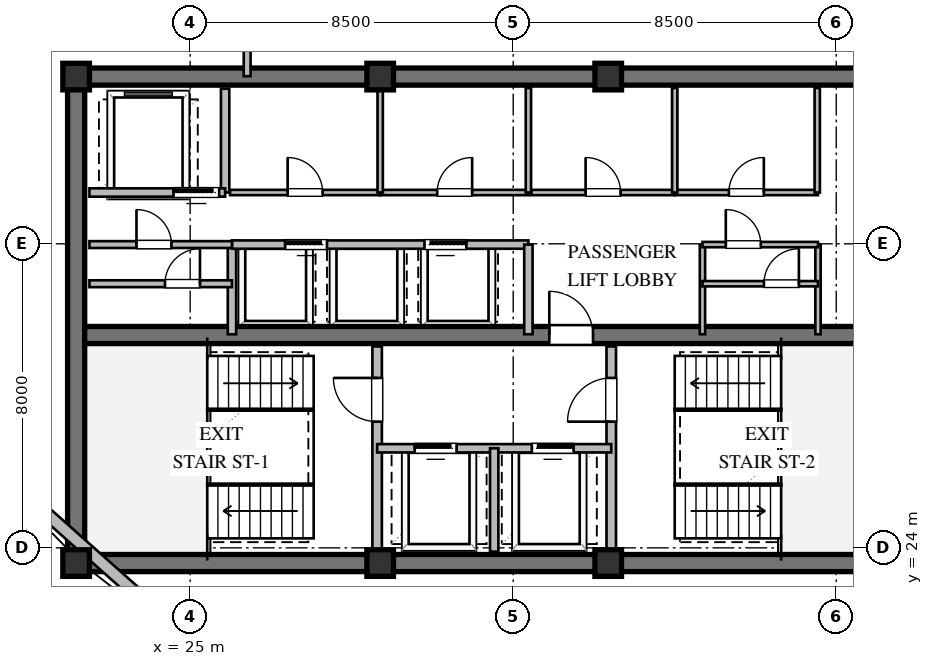
"""IFC4 building model, lengths in metres.
Left out: names, types, materials, properties, quantities, classifications, styles, units other than length and angle.
Written with IfcOpenShell. Run it as: python <this file> out.ifc"""

import sys

from ifc_helpers import new_model, si_unit, direction, frame, frame_2d, origin, origin_2d, place, context, subcontext, project, spatial, rectangle, extrude, element, fill, save


model = new_model("IFC4")
c1 = context("Model", 3, precision=1e-05, world=origin(), true_north=direction((0.0, 1.0)))
c2 = subcontext(c1, "Body", "Model", "MODEL_VIEW")
j1 = project(units=[si_unit("LENGTHUNIT", "METRE"), si_unit("PLANEANGLEUNIT", "RADIAN")], contexts=[c1])
p1 = place(None, origin())
s1 = spatial("IfcSite", under=j1, at=p1, CompositionType="ELEMENT")
p2 = place(p1, origin())
s2 = spatial("IfcBuilding", under=s1, at=p2, CompositionType="ELEMENT")
p3 = place(p2, frame((0.0, 0.0, 289.0)))
s3 = spatial("IfcBuildingStorey", under=s2, at=p3, CompositionType="ELEMENT", Elevation=289.0)
for number, where, z_axis, x_axis in (
    (1, (21.775, 23.6, 0.0), (0.0, 0.0, 1.0), (1.0, 0.0, 0.0)),
    (2, (21.775, 36.4, 0.0), (0.0, 0.0, 1.0), (1.0, 0.0, 0.0)),
):
    element("IfcWall", number, at=place(p3, frame(where, z_axis=z_axis, x_axis=x_axis)), inside=s3, PredefinedType="SHEAR", context=c2, shape_type="SweptSolid", body=[
        extrude(rectangle(XDim=22.45, YDim=0.45, at=frame_2d((11.225, 0.0))), origin(), (0.0, 0.0, 1.0), 3.48),
    ])
p4 = place(p3, frame((22.0, 23.825, 0.0), z_axis=(0.0, 0.0, 1.0), x_axis=(0.0, 1.0, 0.0)))
e3 = element("IfcWall", 3, at=p4, inside=s3, PredefinedType="SHEAR", context=c2, shape_type="SweptSolid", body=[
    extrude(rectangle(XDim=12.35, YDim=0.45, at=frame_2d((6.175, 0.0))), origin(), (0.0, 0.0, 1.0), 3.48),
])
p5 = place(p3, frame((22.225, 29.6, 0.0), z_axis=(0.0, 0.0, 1.0), x_axis=(1.0, 0.0, 0.0)))
e4 = element("IfcWall", 4, at=p5, inside=s3, PredefinedType="SHEAR", context=c2, shape_type="SweptSolid", body=[
    extrude(rectangle(XDim=21.55, YDim=0.45, at=frame_2d((10.775, 0.0))), origin(), (0.0, 0.0, 1.0), 3.48),
])
p6 = place(p5, frame((12.225, 0.0, 0.0)))
e5 = element("IfcOpeningElement", 5, at=p6, cuts=e4, PredefinedType="OPENING", context=c2, shape_type="SweptSolid", body=[
    extrude(rectangle(XDim=1.15, YDim=2.1, at=frame_2d((0.575, 1.05))), frame((0.0, 0.235, 0.0), z_axis=(0.0, -1.0, 0.0), x_axis=(1.0, 0.0, 0.0)), (0.0, 0.0, 1.0), 0.47),
])
for number, where, z_axis, x_axis in (
    (6, (22.0, 23.6, 0.0), (0.0, 0.0, 1.0), (1.0, 0.0, 0.0)),
    (7, (30.0, 23.6, 0.0), (0.0, 0.0, 1.0), (1.0, 0.0, 0.0)),
    (8, (36.0, 23.6, 0.0), (0.0, 0.0, 1.0), (1.0, 0.0, 0.0)),
    (9, (36.0, 36.4, 0.0), (0.0, 0.0, 1.0), (1.0, 0.0, 0.0)),
    (10, (30.0, 36.4, 0.0), (0.0, 0.0, 1.0), (1.0, 0.0, 0.0)),
    (11, (22.0, 36.4, 0.0), (0.0, 0.0, 1.0), (1.0, 0.0, 0.0)),
):
    element("IfcColumn", number, at=place(p3, frame(where, z_axis=z_axis, x_axis=x_axis)), inside=s3, PredefinedType="COLUMN", context=c2, shape_type="SweptSolid", body=[
        extrude(rectangle(XDim=0.7, YDim=0.7, at=origin_2d()), origin(), (0.0, 0.0, 1.0), 3.8),
    ])
p7 = place(p3, frame((24.648, 21.849, 0.0), z_axis=(0.0, 0.0, 1.0), x_axis=(-0.747068410291, 0.664747162721, 0.0)))
e12 = element("IfcWall", 12, at=p7, inside=s3, PredefinedType="STANDARD", context=c2, shape_type="SweptSolid", body=[
    extrude(rectangle(XDim=5.928, YDim=0.32, at=frame_2d((2.964, 0.0))), origin(), (0.0, 0.0, 1.0), 2.35),
])
p8 = place(p3, frame((29.92, 23.9, 0.0), z_axis=(0.0, 0.0, 1.0), x_axis=(0.0, 1.0, 0.0)))
e13 = element("IfcWall", 13, at=p8, inside=s3, PredefinedType="SOLIDWALL", context=c2, shape_type="SweptSolid", body=[
    extrude(rectangle(XDim=5.4, YDim=0.25, at=frame_2d((2.7, 0.0))), origin(), (0.0, 0.0, 1.0), 2.47),
])
p9 = place(p8, frame((3.421, 0.0, 0.0)))
e14 = element("IfcOpeningElement", 14, at=p9, cuts=e13, PredefinedType="OPENING", context=c2, shape_type="SweptSolid", body=[
    extrude(rectangle(XDim=1.15, YDim=2.1, at=frame_2d((0.575, 1.05))), frame((0.0, 0.135, 0.0), z_axis=(0.0, -1.0, 0.0), x_axis=(1.0, 0.0, 0.0)), (0.0, 0.0, 1.0), 0.27),
])
p10 = place(p3, frame((36.08, 23.9, 0.0), z_axis=(0.0, 0.0, 1.0), x_axis=(0.0, 1.0, 0.0)))
e15 = element("IfcWall", 15, at=p10, inside=s3, PredefinedType="SOLIDWALL", context=c2, shape_type="SweptSolid", body=[
    extrude(rectangle(XDim=5.4, YDim=0.25, at=frame_2d((2.7, 0.0))), origin(), (0.0, 0.0, 1.0), 3.48),
])
p11 = place(p10, frame((3.421, 0.0, 0.0)))
e16 = element("IfcOpeningElement", 16, at=p11, cuts=e15, PredefinedType="OPENING", context=c2, shape_type="SweptSolid", body=[
    extrude(rectangle(XDim=1.15, YDim=2.1, at=frame_2d((0.575, 1.05))), frame((0.0, 0.135, 0.0), z_axis=(0.0, -1.0, 0.0), x_axis=(1.0, 0.0, 0.0)), (0.0, 0.0, 1.0), 0.27),
])
p12 = place(p3, frame((29.92, 26.62, 0.0), z_axis=(0.0, 0.0, 1.0), x_axis=(1.0, 0.0, 0.0)))
e17 = element("IfcWall", 17, at=p12, inside=s3, PredefinedType="SOLIDWALL", context=c2, shape_type="SweptSolid", body=[
    extrude(rectangle(XDim=6.16, YDim=0.22, at=frame_2d((3.08, 0.0))), origin(), (0.0, 0.0, 1.0), 3.48),
])
p13 = place(p12, frame((0.99, 0.0, 0.0)))
e18 = element("IfcOpeningElement", 18, at=p13, cuts=e17, PredefinedType="OPENING", context=c2, shape_type="SweptSolid", body=[
    extrude(rectangle(XDim=1.1, YDim=2.1, at=frame_2d((0.55, 1.05))), frame((0.0, 0.12, 0.0), z_axis=(0.0, -1.0, 0.0), x_axis=(1.0, 0.0, 0.0)), (0.0, 0.0, 1.0), 0.24),
])
p14 = place(p12, frame((4.07, 0.0, 0.0)))
e19 = element("IfcOpeningElement", 19, at=p14, cuts=e17, PredefinedType="OPENING", context=c2, shape_type="SweptSolid", body=[
    extrude(rectangle(XDim=1.1, YDim=2.1, at=frame_2d((0.55, 1.05))), frame((0.0, 0.12, 0.0), z_axis=(0.0, -1.0, 0.0), x_axis=(1.0, 0.0, 0.0)), (0.0, 0.0, 1.0), 0.24),
])
p15 = place(p3, frame((33.0, 23.9, 0.0), z_axis=(0.0, 0.0, 1.0), x_axis=(0.0, 1.0, 0.0)))
e20 = element("IfcWall", 20, at=p15, inside=s3, PredefinedType="SOLIDWALL", context=c2, shape_type="SweptSolid", body=[
    extrude(rectangle(XDim=2.72, YDim=0.22, at=frame_2d((1.36, 0.0))), origin(), (0.0, 0.0, 1.0), 3.48),
])
p16 = place(p3, frame((25.92, 33.35, 0.0), z_axis=(0.0, 0.0, 1.0), x_axis=(0.0, 1.0, 0.0)))
e21 = element("IfcWall", 21, at=p16, inside=s3, PredefinedType="SOLIDWALL", context=c2, shape_type="SweptSolid", body=[
    extrude(rectangle(XDim=2.73, YDim=0.22, at=frame_2d((1.365, 0.0))), origin(), (0.0, 0.0, 1.0), 3.48),
])
p17 = place(p3, frame((22.35, 33.35, 0.0), z_axis=(0.0, 0.0, 1.0), x_axis=(1.0, 0.0, 0.0)))
e22 = element("IfcWall", 22, at=p17, inside=s3, PredefinedType="SOLIDWALL", context=c2, shape_type="SweptSolid", body=[
    extrude(rectangle(XDim=3.57, YDim=0.22, at=frame_2d((1.785, 0.0))), origin(), (0.0, 0.0, 1.0), 3.48),
])
p18 = place(p17, frame((2.213, 0.0, 0.0)))
e23 = element("IfcOpeningElement", 23, at=p18, cuts=e22, PredefinedType="OPENING", context=c2, shape_type="SweptSolid", body=[
    extrude(rectangle(XDim=1.2, YDim=2.1, at=frame_2d((0.6, 1.05))), frame((0.0, 0.12, 0.0), z_axis=(0.0, -1.0, 0.0), x_axis=(1.0, 0.0, 0.0)), (0.0, 0.0, 1.0), 0.24),
])
p19 = place(p3, frame((26.1, 29.62, 0.0), z_axis=(0.0, 0.0, 1.0), x_axis=(0.0, 1.0, 0.0)))
e24 = element("IfcWall", 24, at=p19, inside=s3, PredefinedType="SOLIDWALL", context=c2, shape_type="SweptSolid", body=[
    extrude(rectangle(XDim=2.36, YDim=0.22, at=frame_2d((1.18, 0.0))), origin(), (0.0, 0.0, 1.0), 3.48),
])
p20 = place(p3, frame((26.1, 31.98, 0.0), z_axis=(0.0, 0.0, 1.0), x_axis=(1.0, 0.0, 0.0)))
e25 = element("IfcWall", 25, at=p20, inside=s3, PredefinedType="SOLIDWALL", context=c2, shape_type="SweptSolid", body=[
    extrude(rectangle(XDim=7.8, YDim=0.22, at=frame_2d((3.9, 0.0))), origin(), (0.0, 0.0, 1.0), 3.48),
])
p21 = place(p20, frame((1.4, 0.0, 0.0)))
e26 = element("IfcOpeningElement", 26, at=p21, cuts=e25, PredefinedType="OPENING", context=c2, shape_type="SweptSolid", body=[
    extrude(rectangle(XDim=1.1, YDim=2.1, at=frame_2d((0.55, 1.05))), frame((0.0, 0.12, 0.0), z_axis=(0.0, -1.0, 0.0), x_axis=(1.0, 0.0, 0.0)), (0.0, 0.0, 1.0), 0.24),
])
p22 = place(p20, frame((5.066, 0.0, 0.0)))
e27 = element("IfcOpeningElement", 27, at=p22, cuts=e25, PredefinedType="OPENING", context=c2, shape_type="SweptSolid", body=[
    extrude(rectangle(XDim=1.1, YDim=2.1, at=frame_2d((0.55, 1.05))), frame((0.0, 0.12, 0.0), z_axis=(0.0, -1.0, 0.0), x_axis=(1.0, 0.0, 0.0)), (0.0, 0.0, 1.0), 0.24),
])
p23 = place(p3, frame((33.9, 29.62, 0.0), z_axis=(0.0, 0.0, 1.0), x_axis=(0.0, 1.0, 0.0)))
e28 = element("IfcWall", 28, at=p23, inside=s3, PredefinedType="SOLIDWALL", context=c2, shape_type="SweptSolid", body=[
    extrude(rectangle(XDim=2.36, YDim=0.22, at=frame_2d((1.18, 0.0))), origin(), (0.0, 0.0, 1.0), 3.48),
])
p24 = place(p3, frame((26.05, 33.35, 0.0), z_axis=(0.0, 0.0, 1.0), x_axis=(1.0, 0.0, 0.0)))
e29 = element("IfcWall", 29, at=p24, inside=s3, PredefinedType="PARTITIONING", context=c2, shape_type="SweptSolid", body=[
    extrude(rectangle(XDim=3.95, YDim=0.14, at=frame_2d((1.975, 0.0))), origin(), (0.0, 0.0, 1.0), 3.48),
])
p25 = place(p24, frame((1.515, 0.0, 0.0)))
e30 = element("IfcOpeningElement", 30, at=p25, cuts=e29, PredefinedType="OPENING", context=c2, shape_type="SweptSolid", body=[
    extrude(rectangle(XDim=0.92, YDim=2.1, at=frame_2d((0.46, 1.05))), frame((0.0, 0.08, 0.0), z_axis=(0.0, -1.0, 0.0), x_axis=(1.0, 0.0, 0.0)), (0.0, 0.0, 1.0), 0.16),
])
p26 = place(p3, frame((30.0, 33.35, 0.0), z_axis=(0.0, 0.0, 1.0), x_axis=(1.0, 0.0, 0.0)))
e31 = element("IfcWall", 31, at=p26, inside=s3, PredefinedType="PARTITIONING", context=c2, shape_type="SweptSolid", body=[
    extrude(rectangle(XDim=3.92, YDim=0.14, at=frame_2d((1.96, 0.0))), origin(), (0.0, 0.0, 1.0), 3.48),
])
p27 = place(p26, frame((1.5, 0.0, 0.0)))
e32 = element("IfcOpeningElement", 32, at=p27, cuts=e31, PredefinedType="OPENING", context=c2, shape_type="SweptSolid", body=[
    extrude(rectangle(XDim=0.92, YDim=2.1, at=frame_2d((0.46, 1.05))), frame((0.0, 0.08, 0.0), z_axis=(0.0, -1.0, 0.0), x_axis=(1.0, 0.0, 0.0)), (0.0, 0.0, 1.0), 0.16),
])
for number, where, z_axis, x_axis in (
    (33, (30.0, 33.35, 0.0), (0.0, 0.0, 1.0), (0.0, 1.0, 0.0)),
    (34, (33.9, 33.35, 0.0), (0.0, 0.0, 1.0), (0.0, 1.0, 0.0)),
):
    element("IfcWall", number, at=place(p3, frame(where, z_axis=z_axis, x_axis=x_axis)), inside=s3, PredefinedType="PARTITIONING", context=c2, shape_type="SweptSolid", body=[
        extrude(rectangle(XDim=2.75, YDim=0.14, at=frame_2d((1.375, 0.0))), origin(), (0.0, 0.0, 1.0), 3.48),
    ])
p28 = place(p3, frame((33.98, 33.35, 0.0), z_axis=(0.0, 0.0, 1.0), x_axis=(1.0, 0.0, 0.0)))
e35 = element("IfcWall", 35, at=p28, inside=s3, PredefinedType="PARTITIONING", context=c2, shape_type="SweptSolid", body=[
    extrude(rectangle(XDim=3.77, YDim=0.14, at=frame_2d((1.885, 0.0))), origin(), (0.0, 0.0, 1.0), 3.48),
])
p29 = place(p28, frame((1.425, 0.0, 0.0)))
e36 = element("IfcOpeningElement", 36, at=p29, cuts=e35, PredefinedType="OPENING", context=c2, shape_type="SweptSolid", body=[
    extrude(rectangle(XDim=0.92, YDim=2.1, at=frame_2d((0.46, 1.05))), frame((0.0, 0.08, 0.0), z_axis=(0.0, -1.0, 0.0), x_axis=(1.0, 0.0, 0.0)), (0.0, 0.0, 1.0), 0.16),
])
p30 = place(p3, frame((37.75, 33.35, 0.0), z_axis=(0.0, 0.0, 1.0), x_axis=(1.0, 0.0, 0.0)))
e37 = element("IfcWall", 37, at=p30, inside=s3, PredefinedType="PARTITIONING", context=c2, shape_type="SweptSolid", body=[
    extrude(rectangle(XDim=3.77, YDim=0.14, at=frame_2d((1.885, 0.0))), origin(), (0.0, 0.0, 1.0), 3.48),
])
p31 = place(p30, frame((1.425, 0.0, 0.0)))
e38 = element("IfcOpeningElement", 38, at=p31, cuts=e37, PredefinedType="OPENING", context=c2, shape_type="SweptSolid", body=[
    extrude(rectangle(XDim=0.92, YDim=2.1, at=frame_2d((0.46, 1.05))), frame((0.0, 0.08, 0.0), z_axis=(0.0, -1.0, 0.0), x_axis=(1.0, 0.0, 0.0)), (0.0, 0.0, 1.0), 0.16),
])
for number, where, z_axis, x_axis in (
    (39, (37.75, 33.35, 0.0), (0.0, 0.0, 1.0), (0.0, 1.0, 0.0)),
    (40, (41.5, 33.35, 0.0), (0.0, 0.0, 1.0), (0.0, 1.0, 0.0)),
):
    element("IfcWall", number, at=place(p3, frame(where, z_axis=z_axis, x_axis=x_axis)), inside=s3, PredefinedType="PARTITIONING", context=c2, shape_type="SweptSolid", body=[
        extrude(rectangle(XDim=2.75, YDim=0.14, at=frame_2d((1.375, 0.0))), origin(), (0.0, 0.0, 1.0), 3.48),
    ])
p32 = place(p3, frame((22.35, 30.95, 0.0), z_axis=(0.0, 0.0, 1.0), x_axis=(1.0, 0.0, 0.0)))
e41 = element("IfcWall", 41, at=p32, inside=s3, PredefinedType="PARTITIONING", context=c2, shape_type="SweptSolid", body=[
    extrude(rectangle(XDim=3.75, YDim=0.18, at=frame_2d((1.875, 0.0))), origin(), (0.0, 0.0, 1.0), 3.48),
])
p33 = place(p32, frame((1.988, 0.0, 0.0)))
e42 = element("IfcOpeningElement", 42, at=p33, cuts=e41, PredefinedType="OPENING", context=c2, shape_type="SweptSolid", body=[
    extrude(rectangle(XDim=0.92, YDim=2.1, at=frame_2d((0.46, 1.05))), frame((0.0, 0.1, 0.0), z_axis=(0.0, -1.0, 0.0), x_axis=(1.0, 0.0, 0.0)), (0.0, 0.0, 1.0), 0.2),
])
p34 = place(p3, frame((22.35, 31.98, 0.0), z_axis=(0.0, 0.0, 1.0), x_axis=(1.0, 0.0, 0.0)))
e43 = element("IfcWall", 43, at=p34, inside=s3, PredefinedType="PARTITIONING", context=c2, shape_type="SweptSolid", body=[
    extrude(rectangle(XDim=3.75, YDim=0.18, at=frame_2d((1.875, 0.0))), origin(), (0.0, 0.0, 1.0), 3.48),
])
p35 = place(p34, frame((1.238, 0.0, 0.0)))
e44 = element("IfcOpeningElement", 44, at=p35, cuts=e43, PredefinedType="OPENING", context=c2, shape_type="SweptSolid", body=[
    extrude(rectangle(XDim=0.92, YDim=2.1, at=frame_2d((0.46, 1.05))), frame((0.0, 0.1, 0.0), z_axis=(0.0, -1.0, 0.0), x_axis=(1.0, 0.0, 0.0)), (0.0, 0.0, 1.0), 0.2),
])
for number, where, z_axis, x_axis in (
    (45, (38.48, 29.62, 0.0), (0.0, 0.0, 1.0), (0.0, 1.0, 0.0)),
    (46, (41.52, 29.62, 0.0), (0.0, 0.0, 1.0), (0.0, 1.0, 0.0)),
):
    element("IfcWall", number, at=place(p3, frame(where, z_axis=z_axis, x_axis=x_axis)), inside=s3, PredefinedType="PARTITIONING", context=c2, shape_type="SweptSolid", body=[
        extrude(rectangle(XDim=2.36, YDim=0.14, at=frame_2d((1.18, 0.0))), origin(), (0.0, 0.0, 1.0), 3.48),
    ])
p36 = place(p3, frame((38.48, 30.95, 0.0), z_axis=(0.0, 0.0, 1.0), x_axis=(1.0, 0.0, 0.0)))
e47 = element("IfcWall", 47, at=p36, inside=s3, PredefinedType="PARTITIONING", context=c2, shape_type="SweptSolid", body=[
    extrude(rectangle(XDim=3.04, YDim=0.14, at=frame_2d((1.52, 0.0))), origin(), (0.0, 0.0, 1.0), 3.48),
])
p37 = place(p36, frame((1.617, 0.0, 0.0)))
e48 = element("IfcOpeningElement", 48, at=p37, cuts=e47, PredefinedType="OPENING", context=c2, shape_type="SweptSolid", body=[
    extrude(rectangle(XDim=0.92, YDim=2.1, at=frame_2d((0.46, 1.05))), frame((0.0, 0.08, 0.0), z_axis=(0.0, -1.0, 0.0), x_axis=(1.0, 0.0, 0.0)), (0.0, 0.0, 1.0), 0.16),
])
p38 = place(p3, frame((38.48, 31.98, 0.0), z_axis=(0.0, 0.0, 1.0), x_axis=(1.0, 0.0, 0.0)))
e49 = element("IfcWall", 49, at=p38, inside=s3, PredefinedType="PARTITIONING", context=c2, shape_type="SweptSolid", body=[
    extrude(rectangle(XDim=3.04, YDim=0.14, at=frame_2d((1.52, 0.0))), origin(), (0.0, 0.0, 1.0), 3.48),
])
p39 = place(p38, frame((0.614, 0.0, 0.0)))
e50 = element("IfcOpeningElement", 50, at=p39, cuts=e49, PredefinedType="OPENING", context=c2, shape_type="SweptSolid", body=[
    extrude(rectangle(XDim=0.92, YDim=2.1, at=frame_2d((0.46, 1.05))), frame((0.0, 0.08, 0.0), z_axis=(0.0, -1.0, 0.0), x_axis=(1.0, 0.0, 0.0)), (0.0, 0.0, 1.0), 0.16),
])
p40 = place(p3, frame((26.5, 36.41, 0.0), z_axis=(0.0, 0.0, 1.0), x_axis=(0.0, 1.0, 0.0)))
e51 = element("IfcWall", 51, at=p40, inside=s3, PredefinedType="PARTITIONING", context=c2, shape_type="SweptSolid", body=[
    extrude(rectangle(XDim=15.12, YDim=0.18, at=frame_2d((7.56, 0.0))), origin(), (0.0, 0.0, 1.0), 3.48),
])
p41 = place(p40, frame((8.178, 0.0, 0.0)))
e52 = element("IfcOpeningElement", 52, at=p41, cuts=e51, PredefinedType="OPENING", context=c2, shape_type="SweptSolid", body=[
    extrude(rectangle(XDim=1.1, YDim=2.1, at=frame_2d((0.55, 1.05))), frame((0.0, 0.1, 0.0), z_axis=(0.0, -1.0, 0.0), x_axis=(1.0, 0.0, 0.0)), (0.0, 0.0, 1.0), 0.2),
])
p42 = place(p9, origin())
e53 = element("IfcDoor", 53, at=p42, inside=s3, OperationType="SINGLE_SWING_RIGHT", PredefinedType="DOOR", context=c2, shape_type="SweptSolid", body=[
    extrude(rectangle(XDim=1.15, YDim=2.1, at=frame_2d((0.575, 1.05))), frame((0.0, 0.025, 0.0), z_axis=(0.0, -1.0, 0.0), x_axis=(1.0, 0.0, 0.0)), (0.0, 0.0, 1.0), 0.05),
])
fill(e14, e53)
p43 = place(p11, origin())
e54 = element("IfcDoor", 54, at=p43, inside=s3, OperationType="SINGLE_SWING_LEFT", PredefinedType="DOOR", context=c2, shape_type="SweptSolid", body=[
    extrude(rectangle(XDim=1.15, YDim=2.1, at=frame_2d((0.575, 1.05))), frame((0.0, 0.025, 0.0), z_axis=(0.0, -1.0, 0.0), x_axis=(1.0, 0.0, 0.0)), (0.0, 0.0, 1.0), 0.05),
])
fill(e16, e54)
p44 = place(p13, origin())
e55 = element("IfcDoor", 55, at=p44, inside=s3, OperationType="SLIDING_TO_LEFT", PredefinedType="DOOR", context=c2, shape_type="SweptSolid", body=[
    extrude(rectangle(XDim=1.1, YDim=2.1, at=frame_2d((0.55, 1.05))), frame((0.0, 0.025, 0.0), z_axis=(0.0, -1.0, 0.0), x_axis=(1.0, 0.0, 0.0)), (0.0, 0.0, 1.0), 0.05),
])
fill(e18, e55)
p45 = place(p14, origin())
e56 = element("IfcDoor", 56, at=p45, inside=s3, OperationType="SLIDING_TO_RIGHT", PredefinedType="DOOR", context=c2, shape_type="SweptSolid", body=[
    extrude(rectangle(XDim=1.1, YDim=2.1, at=frame_2d((0.55, 1.05))), frame((0.0, 0.025, 0.0), z_axis=(0.0, -1.0, 0.0), x_axis=(1.0, 0.0, 0.0)), (0.0, 0.0, 1.0), 0.05),
])
fill(e19, e56)
p46 = place(p6, origin())
e57 = element("IfcDoor", 57, at=p46, inside=s3, OperationType="SINGLE_SWING_LEFT", PredefinedType="DOOR", context=c2, shape_type="SweptSolid", body=[
    extrude(rectangle(XDim=1.15, YDim=2.1, at=frame_2d((0.575, 1.05))), frame((0.0, 0.025, 0.0), z_axis=(0.0, -1.0, 0.0), x_axis=(1.0, 0.0, 0.0)), (0.0, 0.0, 1.0), 0.05),
])
fill(e5, e57)
p47 = place(p18, origin())
e58 = element("IfcDoor", 58, at=p47, inside=s3, OperationType="SLIDING_TO_LEFT", PredefinedType="DOOR", context=c2, shape_type="SweptSolid", body=[
    extrude(rectangle(XDim=1.2, YDim=2.1, at=frame_2d((0.6, 1.05))), frame((0.0, 0.025, 0.0), z_axis=(0.0, -1.0, 0.0), x_axis=(1.0, 0.0, 0.0)), (0.0, 0.0, 1.0), 0.05),
])
fill(e23, e58)
p48 = place(p21, origin())
e59 = element("IfcDoor", 59, at=p48, inside=s3, OperationType="SLIDING_TO_LEFT", PredefinedType="DOOR", context=c2, shape_type="SweptSolid", body=[
    extrude(rectangle(XDim=1.1, YDim=2.1, at=frame_2d((0.55, 1.05))), frame((0.0, 0.025, 0.0), z_axis=(0.0, -1.0, 0.0), x_axis=(1.0, 0.0, 0.0)), (0.0, 0.0, 1.0), 0.05),
])
fill(e26, e59)
p49 = place(p22, origin())
e60 = element("IfcDoor", 60, at=p49, inside=s3, OperationType="SLIDING_TO_RIGHT", PredefinedType="DOOR", context=c2, shape_type="SweptSolid", body=[
    extrude(rectangle(XDim=1.1, YDim=2.1, at=frame_2d((0.55, 1.05))), frame((0.0, 0.025, 0.0), z_axis=(0.0, -1.0, 0.0), x_axis=(1.0, 0.0, 0.0)), (0.0, 0.0, 1.0), 0.05),
])
fill(e27, e60)
p50 = place(p25, origin())
e61 = element("IfcDoor", 61, at=p50, inside=s3, OperationType="SINGLE_SWING_LEFT", PredefinedType="DOOR", context=c2, shape_type="SweptSolid", body=[
    extrude(rectangle(XDim=0.92, YDim=2.1, at=frame_2d((0.46, 1.05))), frame((0.0, 0.025, 0.0), z_axis=(0.0, -1.0, 0.0), x_axis=(1.0, 0.0, 0.0)), (0.0, 0.0, 1.0), 0.05),
])
fill(e30, e61)
p51 = place(p27, origin())
e62 = element("IfcDoor", 62, at=p51, inside=s3, OperationType="SINGLE_SWING_RIGHT", PredefinedType="DOOR", context=c2, shape_type="SweptSolid", body=[
    extrude(rectangle(XDim=0.92, YDim=2.1, at=frame_2d((0.46, 1.05))), frame((0.0, 0.025, 0.0), z_axis=(0.0, -1.0, 0.0), x_axis=(1.0, 0.0, 0.0)), (0.0, 0.0, 1.0), 0.05),
])
fill(e32, e62)
p52 = place(p29, origin())
e63 = element("IfcDoor", 63, at=p52, inside=s3, OperationType="SINGLE_SWING_LEFT", PredefinedType="DOOR", context=c2, shape_type="SweptSolid", body=[
    extrude(rectangle(XDim=0.92, YDim=2.1, at=frame_2d((0.46, 1.05))), frame((0.0, 0.025, 0.0), z_axis=(0.0, -1.0, 0.0), x_axis=(1.0, 0.0, 0.0)), (0.0, 0.0, 1.0), 0.05),
])
fill(e36, e63)
p53 = place(p31, origin())
e64 = element("IfcDoor", 64, at=p53, inside=s3, OperationType="SINGLE_SWING_RIGHT", PredefinedType="DOOR", context=c2, shape_type="SweptSolid", body=[
    extrude(rectangle(XDim=0.92, YDim=2.1, at=frame_2d((0.46, 1.05))), frame((0.0, 0.025, 0.0), z_axis=(0.0, -1.0, 0.0), x_axis=(1.0, 0.0, 0.0)), (0.0, 0.0, 1.0), 0.05),
])
fill(e38, e64)
p54 = place(p35, origin())
e65 = element("IfcDoor", 65, at=p54, inside=s3, OperationType="SINGLE_SWING_LEFT", PredefinedType="DOOR", context=c2, shape_type="SweptSolid", body=[
    extrude(rectangle(XDim=0.92, YDim=2.1, at=frame_2d((0.46, 1.05))), frame((0.0, 0.025, 0.0), z_axis=(0.0, -1.0, 0.0), x_axis=(1.0, 0.0, 0.0)), (0.0, 0.0, 1.0), 0.05),
])
fill(e44, e65)
p55 = place(p33, origin())
e66 = element("IfcDoor", 66, at=p55, inside=s3, OperationType="SINGLE_SWING_RIGHT", PredefinedType="DOOR", context=c2, shape_type="SweptSolid", body=[
    extrude(rectangle(XDim=0.92, YDim=2.1, at=frame_2d((0.46, 1.05))), frame((0.0, 0.025, 0.0), z_axis=(0.0, -1.0, 0.0), x_axis=(1.0, 0.0, 0.0)), (0.0, 0.0, 1.0), 0.05),
])
fill(e42, e66)
p56 = place(p39, origin())
e67 = element("IfcDoor", 67, at=p56, inside=s3, OperationType="SINGLE_SWING_LEFT", PredefinedType="DOOR", context=c2, shape_type="SweptSolid", body=[
    extrude(rectangle(XDim=0.92, YDim=2.1, at=frame_2d((0.46, 1.05))), frame((0.0, 0.025, 0.0), z_axis=(0.0, -1.0, 0.0), x_axis=(1.0, 0.0, 0.0)), (0.0, 0.0, 1.0), 0.05),
])
fill(e50, e67)
p57 = place(p37, origin())
e68 = element("IfcDoor", 68, at=p57, inside=s3, OperationType="SINGLE_SWING_RIGHT", PredefinedType="DOOR", context=c2, shape_type="SweptSolid", body=[
    extrude(rectangle(XDim=0.92, YDim=2.1, at=frame_2d((0.46, 1.05))), frame((0.0, 0.025, 0.0), z_axis=(0.0, -1.0, 0.0), x_axis=(1.0, 0.0, 0.0)), (0.0, 0.0, 1.0), 0.05),
])
fill(e48, e68)
save(model, sys.argv[1])
